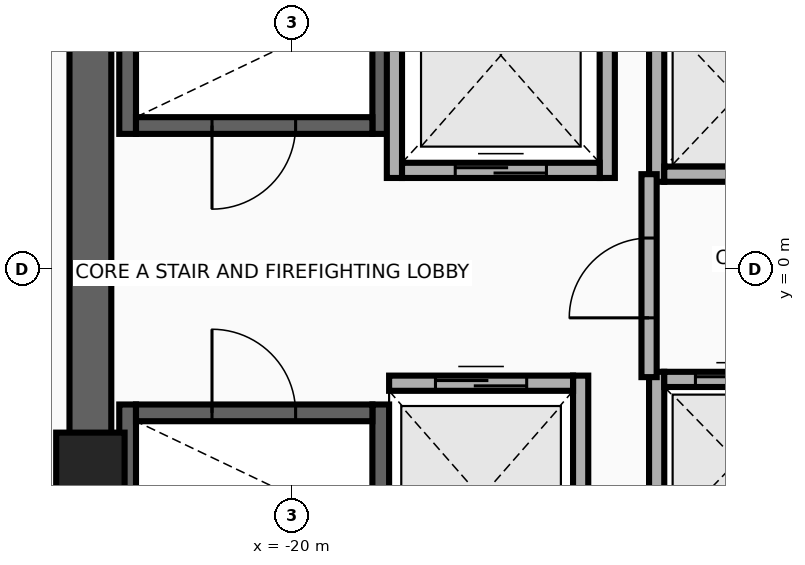
"""IFC4 building model, lengths in metres.
Left out: names, types, materials, properties, quantities, classifications, styles, units other than length and angle.
Written with IfcOpenShell. Run it as: python <this file> out.ifc"""

import sys

from ifc_helpers import new_model, si_unit, direction, frame, frame_2d, origin, origin_2d, place, context, subcontext, project, spatial, rectangle, extrude, source, transform, mapped, element, fill, save


model = new_model("IFC4")
c1 = context("Model", 3, precision=1e-05, world=origin(), true_north=direction((0.0, 1.0)))
c2 = subcontext(c1, "Body", "Model", "MODEL_VIEW")
j1 = project(units=[si_unit("LENGTHUNIT", "METRE"), si_unit("PLANEANGLEUNIT", "RADIAN")], contexts=[c1])
p1 = place(None, origin())
s1 = spatial("IfcSite", under=j1, at=p1, CompositionType="ELEMENT")
p2 = place(p1, origin())
s2 = spatial("IfcBuilding", under=s1, at=p2, CompositionType="ELEMENT")
p3 = place(p2, frame((0.0, 0.0, 201.0)))
s3 = spatial("IfcBuildingStorey", under=s2, at=p3, CompositionType="ELEMENT", Elevation=201.0)
for number, where, z_axis, x_axis in (
    (1, (-22.16, 1.78, 0.0), (0.0, 0.0, 1.0), (0.0, 1.0, 0.0)),
    (2, (-18.83, 1.78, 0.0), (0.0, 0.0, 1.0), (0.0, 1.0, 0.0)),
):
    element("IfcWall", number, at=place(p3, frame(where, z_axis=z_axis, x_axis=x_axis)), inside=s3, PredefinedType="SHEAR", context=c2, shape_type="SweptSolid", body=[
        extrude(rectangle(XDim=8.745, YDim=0.22, at=frame_2d((4.373, 0.0))), origin(), (0.0, 0.0, 1.0), 4.26),
    ])
p4 = place(p3, frame((-22.05, 1.89, 0.0), z_axis=(0.0, 0.0, 1.0), x_axis=(1.0, 0.0, 0.0)))
e3 = element("IfcWall", 3, at=p4, inside=s3, PredefinedType="SHEAR", context=c2, shape_type="SweptSolid", body=[
    extrude(rectangle(XDim=3.11, YDim=0.22, at=frame_2d((1.555, 0.0))), origin(), (0.0, 0.0, 1.0), 4.26),
])
p5 = place(p4, frame((1.0, 0.0, 0.0)))
e4 = element("IfcOpeningElement", 4, at=p5, cuts=e3, PredefinedType="OPENING", context=c2, shape_type="SweptSolid", body=[
    extrude(rectangle(XDim=1.1, YDim=2.15, at=frame_2d((0.55, 1.075))), frame((0.0, 0.125, 0.0), z_axis=(0.0, -1.0, 0.0), x_axis=(1.0, 0.0, 0.0)), (0.0, 0.0, 1.0), 0.25),
])
for number, where, z_axis, x_axis in (
    (5, (-22.16, -10.525, 0.0), (0.0, 0.0, 1.0), (0.0, 1.0, 0.0)),
    (6, (-18.83, -10.525, 0.0), (0.0, 0.0, 1.0), (0.0, 1.0, 0.0)),
):
    element("IfcWall", number, at=place(p3, frame(where, z_axis=z_axis, x_axis=x_axis)), inside=s3, PredefinedType="SHEAR", context=c2, shape_type="SweptSolid", body=[
        extrude(rectangle(XDim=8.745, YDim=0.22, at=frame_2d((4.373, 0.0))), origin(), (0.0, 0.0, 1.0), 4.26),
    ])
p6 = place(p3, frame((-22.05, -1.89, 0.0), z_axis=(0.0, 0.0, 1.0), x_axis=(1.0, 0.0, 0.0)))
e7 = element("IfcWall", 7, at=p6, inside=s3, PredefinedType="SHEAR", context=c2, shape_type="SweptSolid", body=[
    extrude(rectangle(XDim=3.11, YDim=0.22, at=frame_2d((1.555, 0.0))), origin(), (0.0, 0.0, 1.0), 4.26),
])
p7 = place(p6, frame((1.0, 0.0, 0.0)))
e8 = element("IfcOpeningElement", 8, at=p7, cuts=e7, PredefinedType="OPENING", context=c2, shape_type="SweptSolid", body=[
    extrude(rectangle(XDim=1.1, YDim=2.15, at=frame_2d((0.55, 1.075))), frame((0.0, 0.125, 0.0), z_axis=(0.0, -1.0, 0.0), x_axis=(1.0, 0.0, 0.0)), (0.0, 0.0, 1.0), 0.25),
])
p8 = place(p3, frame((-22.65, -11.075, 0.0), z_axis=(0.0, 0.0, 1.0), x_axis=(0.0, 1.0, 0.0)))
e9 = element("IfcWall", 9, at=p8, inside=s3, PredefinedType="SHEAR", context=c2, shape_type="SweptSolid", body=[
    extrude(rectangle(XDim=22.15, YDim=0.55, at=frame_2d((11.075, 0.0))), origin(), (0.0, 0.0, 1.0), 4.26),
])
m1 = source(origin(), c2, "Body", "SweptSolid", [
    extrude(rectangle(XDim=0.9, YDim=0.9, at=origin_2d()), origin(), (0.0, 0.0, 1.0), 4.5),
])
p9 = place(p3, frame((-22.65, -2.6, 0.0), z_axis=(0.0, 0.0, 1.0), x_axis=(1.0, 0.0, 0.0)))
e10 = element("IfcColumn", 10, at=p9, inside=s3, PredefinedType="COLUMN", context=c2, shape_type="MappedRepresentation", body=[
    mapped(m1, transform((0.0, 0.0, 0.0), x_axis=(1.0, 0.0, 0.0), y_axis=(0.0, 1.0, 0.0), z_axis=(0.0, 0.0, 1.0), scale=1.0)),
])
for number, where, z_axis, x_axis in (
    (11, (-18.65, 1.2, 0.0), (0.0, 0.0, 1.0), (0.0, 1.0, 0.0)),
    (12, (-15.85, 1.2, 0.0), (0.0, 0.0, 1.0), (0.0, 1.0, 0.0)),
):
    element("IfcWall", number, at=place(p3, frame(where, z_axis=z_axis, x_axis=x_axis)), inside=s3, PredefinedType="MOVABLE", context=c2, shape_type="SweptSolid", body=[
        extrude(rectangle(XDim=3.225, YDim=0.2, at=frame_2d((1.613, 0.0))), origin(), (0.0, 0.0, 1.0), 4.26),
    ])
p10 = place(p3, frame((-18.55, 1.3, 0.0), z_axis=(0.0, 0.0, 1.0), x_axis=(1.0, 0.0, 0.0)))
e13 = element("IfcWall", 13, at=p10, inside=s3, PredefinedType="MOVABLE", context=c2, shape_type="SweptSolid", body=[
    extrude(rectangle(XDim=2.6, YDim=0.2, at=frame_2d((1.3, 0.0))), origin(), (0.0, 0.0, 1.0), 4.26),
])
p11 = place(p10, frame((0.7, 0.0, 0.0)))
e14 = element("IfcOpeningElement", 14, at=p11, cuts=e13, PredefinedType="OPENING", context=c2, shape_type="SweptSolid", body=[
    extrude(rectangle(XDim=1.2, YDim=2.1, at=frame_2d((0.6, 1.05))), frame((0.0, 0.115, 0.0), z_axis=(0.0, -1.0, 0.0), x_axis=(1.0, 0.0, 0.0)), (0.0, 0.0, 1.0), 0.23),
])
p12 = place(p3, frame((-16.2, -4.6, 0.0), z_axis=(0.0, 0.0, 1.0), x_axis=(0.0, 1.0, 0.0)))
e15 = element("IfcWall", 15, at=p12, inside=s3, PredefinedType="MOVABLE", context=c2, shape_type="SweptSolid", body=[
    extrude(rectangle(XDim=3.2, YDim=0.2, at=frame_2d((1.6, 0.0))), origin(), (0.0, 0.0, 1.0), 4.26),
])
p13 = place(p3, frame((-18.72, -1.5, 0.0), z_axis=(0.0, 0.0, 1.0), x_axis=(1.0, 0.0, 0.0)))
e16 = element("IfcWall", 16, at=p13, inside=s3, PredefinedType="MOVABLE", context=c2, shape_type="SweptSolid", body=[
    extrude(rectangle(XDim=2.42, YDim=0.2, at=frame_2d((1.21, 0.0))), origin(), (0.0, 0.0, 1.0), 4.26),
])
p14 = place(p13, frame((0.61, 0.0, 0.0)))
e17 = element("IfcOpeningElement", 17, at=p14, cuts=e16, PredefinedType="OPENING", context=c2, shape_type="SweptSolid", body=[
    extrude(rectangle(XDim=1.2, YDim=2.1, at=frame_2d((0.6, 1.05))), frame((0.0, 0.115, 0.0), z_axis=(0.0, -1.0, 0.0), x_axis=(1.0, 0.0, 0.0)), (0.0, 0.0, 1.0), 0.23),
])
p15 = place(p3, frame((-15.2, 1.15, 0.0), z_axis=(0.0, 0.0, 1.0), x_axis=(0.0, 1.0, 0.0)))
e18 = element("IfcWall", 18, at=p15, inside=s3, PredefinedType="MOVABLE", context=c2, shape_type="SweptSolid", body=[
    extrude(rectangle(XDim=2.25, YDim=0.2, at=frame_2d((1.125, 0.0))), origin(), (0.0, 0.0, 1.0), 4.26),
])
p16 = place(p3, frame((-15.1, 1.25, 0.0), z_axis=(0.0, 0.0, 1.0), x_axis=(1.0, 0.0, 0.0)))
e19 = element("IfcWall", 19, at=p16, inside=s3, PredefinedType="MOVABLE", context=c2, shape_type="SweptSolid", body=[
    extrude(rectangle(XDim=1.92, YDim=0.2, at=frame_2d((0.96, 0.0))), origin(), (0.0, 0.0, 1.0), 4.26),
])
p17 = place(p3, frame((-15.2, -3.7, 0.0), z_axis=(0.0, 0.0, 1.0), x_axis=(0.0, 1.0, 0.0)))
e20 = element("IfcWall", 20, at=p17, inside=s3, PredefinedType="MOVABLE", context=c2, shape_type="SweptSolid", body=[
    extrude(rectangle(XDim=2.35, YDim=0.2, at=frame_2d((1.175, 0.0))), origin(), (0.0, 0.0, 1.0), 4.26),
])
p18 = place(p3, frame((-15.1, -1.45, 0.0), z_axis=(0.0, 0.0, 1.0), x_axis=(1.0, 0.0, 0.0)))
e21 = element("IfcWall", 21, at=p18, inside=s3, PredefinedType="MOVABLE", context=c2, shape_type="SweptSolid", body=[
    extrude(rectangle(XDim=1.92, YDim=0.2, at=frame_2d((0.96, 0.0))), origin(), (0.0, 0.0, 1.0), 4.26),
])
p19 = place(p18, frame((0.41, 0.0, 0.0)))
e22 = element("IfcOpeningElement", 22, at=p19, cuts=e21, PredefinedType="OPENING", context=c2, shape_type="SweptSolid", body=[
    extrude(rectangle(XDim=1.1, YDim=2.1, at=frame_2d((0.55, 1.05))), frame((0.0, 0.115, 0.0), z_axis=(0.0, -1.0, 0.0), x_axis=(1.0, 0.0, 0.0)), (0.0, 0.0, 1.0), 0.23),
])
p20 = place(p3, frame((-15.3, -1.42, 0.0), z_axis=(0.0, 0.0, 1.0), x_axis=(0.0, 1.0, 0.0)))
e23 = element("IfcWall", 23, at=p20, inside=s3, PredefinedType="PARTITIONING", context=c2, shape_type="SweptSolid", body=[
    extrude(rectangle(XDim=2.67, YDim=0.2, at=frame_2d((1.335, 0.0))), origin(), (0.0, 0.0, 1.0), 4.26),
])
p21 = place(p20, frame((0.78, 0.0, 0.0)))
e24 = element("IfcOpeningElement", 24, at=p21, cuts=e23, PredefinedType="OPENING", context=c2, shape_type="SweptSolid", body=[
    extrude(rectangle(XDim=1.05, YDim=2.15, at=frame_2d((0.525, 1.075))), frame((0.0, 0.115, 0.0), z_axis=(0.0, -1.0, 0.0), x_axis=(1.0, 0.0, 0.0)), (0.0, 0.0, 1.0), 0.23),
])
p22 = place(p11, origin())
e25 = element("IfcDoor", 25, at=p22, inside=s3, OperationType="DOUBLE_DOOR_SLIDING", PredefinedType="DOOR", context=c2, shape_type="SweptSolid", body=[
    extrude(rectangle(XDim=1.2, YDim=2.1, at=frame_2d((0.6, 1.05))), frame((0.0, 0.025, 0.0), z_axis=(0.0, -1.0, 0.0), x_axis=(1.0, 0.0, 0.0)), (0.0, 0.0, 1.0), 0.05),
])
fill(e14, e25)
p23 = place(p14, origin())
e26 = element("IfcDoor", 26, at=p23, inside=s3, OperationType="DOUBLE_DOOR_SLIDING", PredefinedType="DOOR", context=c2, shape_type="SweptSolid", body=[
    extrude(rectangle(XDim=1.2, YDim=2.1, at=frame_2d((0.6, 1.05))), frame((0.0, 0.025, 0.0), z_axis=(0.0, -1.0, 0.0), x_axis=(1.0, 0.0, 0.0)), (0.0, 0.0, 1.0), 0.05),
])
fill(e17, e26)
p24 = place(p19, origin())
e27 = element("IfcDoor", 27, at=p24, inside=s3, OperationType="DOUBLE_DOOR_SLIDING", PredefinedType="DOOR", context=c2, shape_type="SweptSolid", body=[
    extrude(rectangle(XDim=1.1, YDim=2.1, at=frame_2d((0.55, 1.05))), frame((0.0, 0.025, 0.0), z_axis=(0.0, -1.0, 0.0), x_axis=(1.0, 0.0, 0.0)), (0.0, 0.0, 1.0), 0.05),
])
fill(e22, e27)
p25 = place(p21, origin())
e28 = element("IfcDoor", 28, at=p25, inside=s3, OperationType="SINGLE_SWING_RIGHT", PredefinedType="DOOR", context=c2, shape_type="SweptSolid", body=[
    extrude(rectangle(XDim=1.05, YDim=2.15, at=frame_2d((0.525, 1.075))), frame((0.0, 0.025, 0.0), z_axis=(0.0, -1.0, 0.0), x_axis=(1.0, 0.0, 0.0)), (0.0, 0.0, 1.0), 0.05),
])
fill(e24, e28)
p26 = place(p5, frame((1.1, 0.0, 0.0), z_axis=(0.0, 0.0, 1.0), x_axis=(-1.0, 0.0, 0.0)))
e29 = element("IfcDoor", 29, at=p26, inside=s3, OperationType="SINGLE_SWING_LEFT", PredefinedType="DOOR", context=c2, shape_type="SweptSolid", body=[
    extrude(rectangle(XDim=1.1, YDim=2.15, at=frame_2d((0.55, 1.075))), frame((0.0, 0.025, 0.0), z_axis=(0.0, -1.0, 0.0), x_axis=(1.0, 0.0, 0.0)), (0.0, 0.0, 1.0), 0.05),
])
fill(e4, e29)
p27 = place(p7, origin())
e30 = element("IfcDoor", 30, at=p27, inside=s3, OperationType="SINGLE_SWING_RIGHT", PredefinedType="DOOR", context=c2, shape_type="SweptSolid", body=[
    extrude(rectangle(XDim=1.1, YDim=2.15, at=frame_2d((0.55, 1.075))), frame((0.0, 0.025, 0.0), z_axis=(0.0, -1.0, 0.0), x_axis=(1.0, 0.0, 0.0)), (0.0, 0.0, 1.0), 0.05),
])
fill(e8, e30)
save(model, sys.argv[1])
